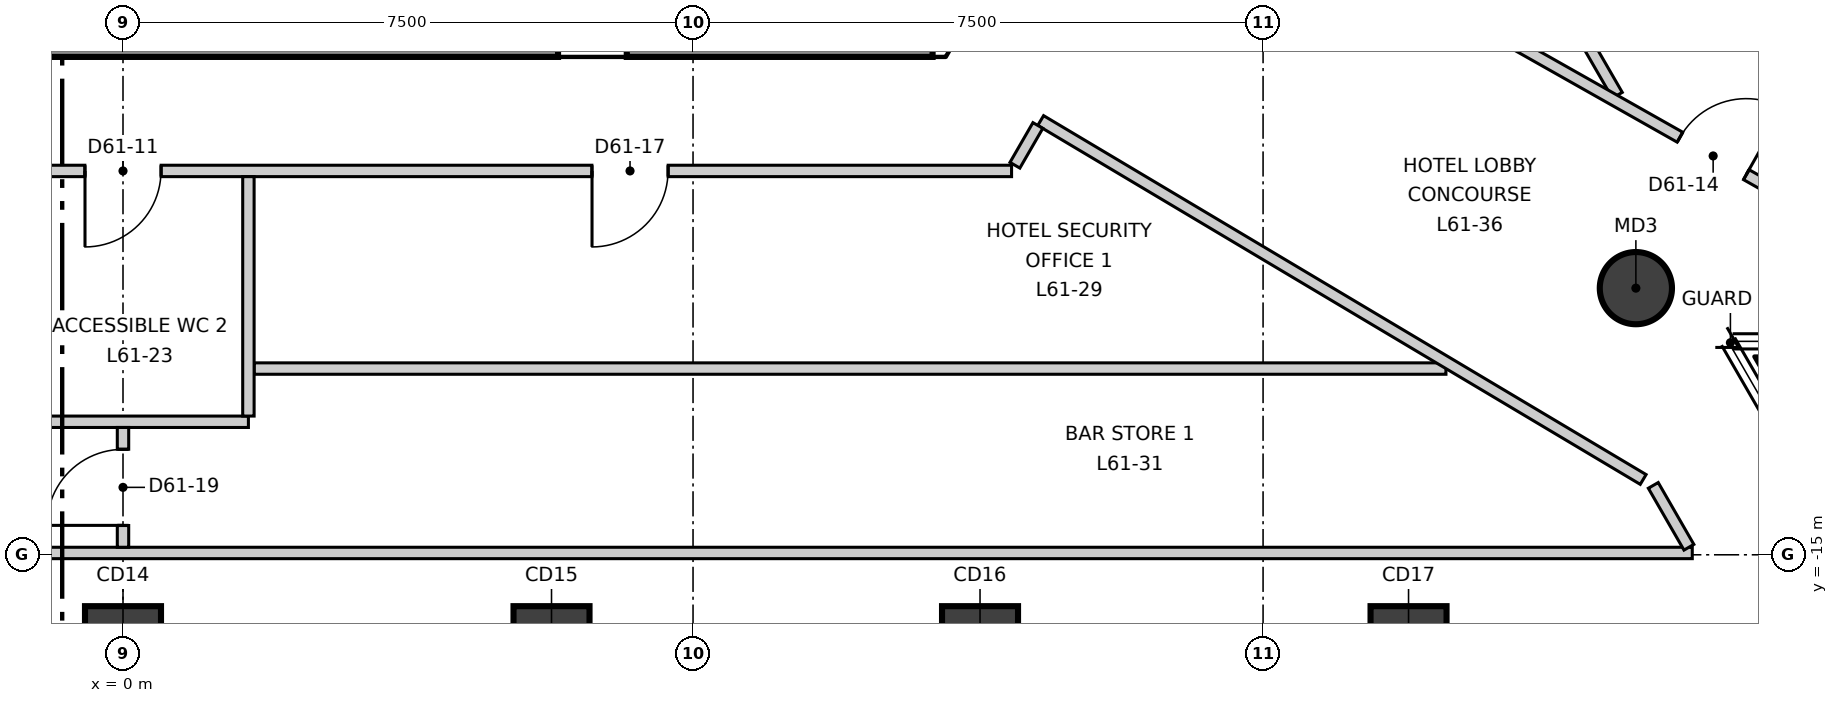
"""IFC4 building model, lengths in metres.
Left out: names, types, materials, properties, quantities, classifications, styles, units other than length and angle.
Written with IfcOpenShell. Run it as: python <this file> out.ifc"""

import sys

from ifc_helpers import new_model, si_unit, direction, frame, frame_2d, origin, origin_2d, place, context, subcontext, project, spatial, polyline, rectangle, circle, outline, extrude, element, fill, save


model = new_model("IFC4")
c1 = context("Model", 3, precision=1e-05, world=origin(), true_north=direction((0.0, 1.0)))
c2 = subcontext(c1, "Body", "Model", "MODEL_VIEW")
j1 = project(units=[si_unit("LENGTHUNIT", "METRE"), si_unit("PLANEANGLEUNIT", "RADIAN")], contexts=[c1])
p1 = place(None, origin())
s1 = spatial("IfcSite", under=j1, at=p1, CompositionType="ELEMENT")
p2 = place(p1, origin())
s2 = spatial("IfcBuilding", under=s1, at=p2, CompositionType="ELEMENT")
p3 = place(p2, frame((0.0, 0.0, 261.8)))
s3 = spatial("IfcBuildingStorey", under=s2, at=p3, CompositionType="ELEMENT", Elevation=261.8)
p4 = place(p3, frame((-10.652, -8.15, -0.3), z_axis=(0.0, 0.0, 1.0), x_axis=(1.0, 0.0, 0.0)))
e1 = element("IfcWall", 1, at=p4, inside=s3, PredefinedType="SHEAR", context=c2, shape_type="SweptSolid", body=[
    extrude(outline(polyline([(-0.173, -0.3), (1.795, -0.3), (3.763, -0.3), (5.731, -0.3), (7.7, -0.3), (9.668, -0.3), (11.636, -0.3), (13.604, -0.3), (15.573, -0.3), (17.541, -0.3), (19.509, -0.3), (21.477, -0.3), (21.131, 0.3), (19.226, 0.3), (17.321, 0.3), (15.415, 0.3), (13.51, 0.3), (11.605, 0.3), (9.699, 0.3), (7.794, 0.3), (5.889, 0.3), (3.984, 0.3), (2.078, 0.3), (0.173, 0.3), (-0.173, -0.3)])), origin(), (0.0, 0.0, 1.0), 6.5),
])
p5 = place(p4, frame((4.026, 0.0, 0.3)))
e2 = element("IfcOpeningElement", 2, at=p5, cuts=e1, PredefinedType="OPENING", context=c2, shape_type="SweptSolid", body=[
    extrude(rectangle(XDim=0.9, YDim=2.1, at=frame_2d((0.45, 1.05))), frame((0.0, 0.31, 0.0), z_axis=(0.0, -1.0, 0.0), x_axis=(1.0, 0.0, 0.0)), (0.0, 0.0, 1.0), 0.62),
])
p6 = place(p4, frame((16.378, 0.0, 0.3)))
e3 = element("IfcOpeningElement", 3, at=p6, cuts=e1, PredefinedType="OPENING", context=c2, shape_type="SweptSolid", body=[
    extrude(rectangle(XDim=0.9, YDim=2.1, at=frame_2d((0.45, 1.05))), frame((0.0, 0.31, 0.0), z_axis=(0.0, -1.0, 0.0), x_axis=(1.0, 0.0, 0.0)), (0.0, 0.0, 1.0), 0.62),
])
p7 = place(p3, frame((10.652, -8.15, -0.3), z_axis=(0.0, 0.0, 1.0), x_axis=(0.49997462182, 0.866040055388, 0.0)))
e4 = element("IfcWall", 4, at=p7, inside=s3, PredefinedType="SHEAR", context=c2, shape_type="SweptSolid", body=[
    extrude(outline(polyline([(-0.173, -0.3), (1.732, -0.301), (3.638, -0.301), (3.291, 0.3), (1.732, 0.3), (0.173, 0.3), (-0.173, -0.3)])), origin(), (0.0, 0.0, 1.0), 6.5),
])
p8 = place(p7, frame((1.032, 0.0, 0.3)))
e5 = element("IfcOpeningElement", 5, at=p8, cuts=e4, PredefinedType="OPENING", context=c2, shape_type="SweptSolid", body=[
    extrude(rectangle(XDim=1.4, YDim=2.1, at=frame_2d((0.7, 1.05))), frame((0.0, 0.31, 0.0), z_axis=(0.0, -1.0, 0.0), x_axis=(1.0, 0.0, 0.0)), (0.0, 0.0, 1.0), 0.621),
])
for number, where, z_axis, x_axis in (
    (6, (0.0, -16.076, -0.3), (0.0, 0.0, 1.0), (1.0, 0.0, 0.0)),
    (7, (5.638, -16.076, -0.3), (0.0, 0.0, 1.0), (1.0, 0.0, 0.0)),
    (8, (11.276, -16.076, -0.3), (0.0, 0.0, 1.0), (1.0, 0.0, 0.0)),
    (9, (16.914, -16.076, -0.3), (0.0, 0.0, 1.0), (1.0, 0.0, 0.0)),
):
    element("IfcColumn", number, at=place(p3, frame(where, z_axis=z_axis, x_axis=x_axis)), inside=s3, PredefinedType="COLUMN", context=c2, shape_type="SweptSolid", body=[
        extrude(rectangle(XDim=1.0, YDim=0.8, at=origin_2d()), origin(), (0.0, 0.0, 1.0), 6.5),
    ])
p9 = place(p3, frame((19.905, -11.492, -0.3), z_axis=(0.0, 0.0, 1.0), x_axis=(1.0, 0.0, 0.0)))
e10 = element("IfcColumn", 10, at=p9, inside=s3, PredefinedType="COLUMN", context=c2, shape_type="SweptSolid", body=[
    extrude(circle(Radius=0.475, at=origin_2d()), origin(), (0.0, 0.0, 1.0), 6.5),
])
p10 = place(p3, frame((2.689, 25.293, 0.0), z_axis=(0.0, 0.0, 1.0), x_axis=(0.500022309378, -0.866012523076, 0.0)))
e11 = element("IfcWall", 11, at=p10, inside=s3, PredefinedType="PARTITIONING", context=c2, shape_type="SweptSolid", body=[
    extrude(rectangle(XDim=41.206, YDim=0.15, at=frame_2d((20.603, 0.0))), origin(), (0.0, 0.0, 1.0), 6.2),
])
p11 = place(p3, frame((2.166, 21.349, 0.0), z_axis=(0.0, 0.0, 1.0), x_axis=(0.499984980739, -0.866034074985, 0.0)))
e12 = element("IfcWall", 12, at=p11, inside=s3, PredefinedType="PARTITIONING", context=c2, shape_type="SweptSolid", body=[
    extrude(rectangle(XDim=34.991, YDim=0.15, at=frame_2d((17.495, 0.0))), origin(), (0.0, 0.0, 1.0), 6.2),
])
p12 = place(p3, frame((14.048, -5.869, 0.0), z_axis=(0.0, 0.0, 1.0), x_axis=(0.870623660774, -0.491949632889, 0.0)))
e13 = element("IfcWall", 13, at=p12, inside=s3, PredefinedType="PARTITIONING", context=c2, shape_type="SweptSolid", body=[
    extrude(rectangle(XDim=9.194, YDim=0.15, at=frame_2d((4.597, 0.0))), origin(), (0.0, 0.0, 1.0), 5.65),
])
p13 = place(p12, frame((7.395, 0.0, 0.0)))
e14 = element("IfcOpeningElement", 14, at=p13, cuts=e13, PredefinedType="OPENING", context=c2, shape_type="SweptSolid", body=[
    extrude(rectangle(XDim=1.0, YDim=2.1, at=frame_2d((0.5, 1.05))), frame((0.0, 0.085, 0.0), z_axis=(0.0, -1.0, 0.0), x_axis=(1.0, 0.0, 0.0)), (0.0, 0.0, 1.0), 0.17),
])
p14 = place(p3, frame((-11.605, -9.95, 0.0), z_axis=(0.0, 0.0, 1.0), x_axis=(1.0, 0.0, 0.0)))
e15 = element("IfcWall", 15, at=p14, inside=s3, PredefinedType="PARTITIONING", context=c2, shape_type="SweptSolid", body=[
    extrude(rectangle(XDim=23.296, YDim=0.15, at=frame_2d((11.648, 0.0))), origin(), (0.0, 0.0, 1.0), 6.2),
])
p15 = place(p14, frame((11.105, 0.0, 0.0)))
e16 = element("IfcOpeningElement", 16, at=p15, cuts=e15, PredefinedType="OPENING", context=c2, shape_type="SweptSolid", body=[
    extrude(rectangle(XDim=1.0, YDim=2.1, at=frame_2d((0.5, 1.05))), frame((0.0, 0.085, 0.0), z_axis=(0.0, -1.0, 0.0), x_axis=(1.0, 0.0, 0.0)), (0.0, 0.0, 1.0), 0.17),
])
p16 = place(p14, frame((4.034, 0.0, 0.0)))
e17 = element("IfcOpeningElement", 17, at=p16, cuts=e15, PredefinedType="OPENING", context=c2, shape_type="SweptSolid", body=[
    extrude(rectangle(XDim=1.8, YDim=2.1, at=frame_2d((0.9, 1.05))), frame((0.0, 0.085, 0.0), z_axis=(0.0, -1.0, 0.0), x_axis=(1.0, 0.0, 0.0)), (0.0, 0.0, 1.0), 0.17),
])
p17 = place(p14, frame((17.776, 0.0, 0.0)))
e18 = element("IfcOpeningElement", 18, at=p17, cuts=e15, PredefinedType="OPENING", context=c2, shape_type="SweptSolid", body=[
    extrude(rectangle(XDim=1.0, YDim=2.1, at=frame_2d((0.5, 1.05))), frame((0.0, 0.085, 0.0), z_axis=(0.0, -1.0, 0.0), x_axis=(1.0, 0.0, 0.0)), (0.0, 0.0, 1.0), 0.17),
])
p18 = place(p3, frame((-20.647, -14.976, 0.0), z_axis=(0.0, 0.0, 1.0), x_axis=(1.0, 0.0, 0.0)))
e19 = element("IfcWall", 19, at=p18, inside=s3, PredefinedType="PARTITIONING", context=c2, shape_type="SweptSolid", body=[
    extrude(rectangle(XDim=41.294, YDim=0.15, at=frame_2d((20.647, 0.0))), origin(), (0.0, 0.0, 1.0), 6.2),
])
p19 = place(p18, frame((10.047, 0.0, 0.0)))
e20 = element("IfcOpeningElement", 20, at=p19, cuts=e19, PredefinedType="OPENING", context=c2, shape_type="SweptSolid", body=[
    extrude(rectangle(XDim=2.4, YDim=2.1, at=frame_2d((1.2, 1.05))), frame((0.0, 0.085, 0.0), z_axis=(0.0, -1.0, 0.0), x_axis=(1.0, 0.0, 0.0)), (0.0, 0.0, 1.0), 0.17),
])
p20 = place(p3, frame((1.725, -12.55, 0.0), z_axis=(0.0, 0.0, 1.0), x_axis=(1.0, 0.0, 0.0)))
e21 = element("IfcWall", 21, at=p20, inside=s3, PredefinedType="PARTITIONING", context=c2, shape_type="SweptSolid", body=[
    extrude(rectangle(XDim=15.681, YDim=0.15, at=frame_2d((7.84, 0.0))), origin(), (0.0, 0.0, 1.0), 6.2),
])
p21 = place(p3, frame((20.134, -14.087, 0.0), z_axis=(0.0, 0.0, 1.0), x_axis=(0.499242408381, -0.866462357909, 0.0)))
e22 = element("IfcWall", 22, at=p21, inside=s3, PredefinedType="PARTITIONING", context=c2, shape_type="SweptSolid", body=[
    extrude(rectangle(XDim=0.939, YDim=0.15, at=frame_2d((0.47, 0.0))), origin(), (0.0, 0.0, 1.0), 6.2),
])
p22 = place(p3, frame((-1.575, -13.25, 0.0), z_axis=(0.0, 0.0, 1.0), x_axis=(1.0, 0.0, 0.0)))
e23 = element("IfcWall", 23, at=p22, inside=s3, PredefinedType="PARTITIONING", context=c2, shape_type="SweptSolid", body=[
    extrude(rectangle(XDim=3.225, YDim=0.15, at=frame_2d((1.612, 0.0))), origin(), (0.0, 0.0, 1.0), 6.2),
])
p23 = place(p3, frame((0.0, -14.901, 0.0), z_axis=(0.0, 0.0, 1.0), x_axis=(0.0, 1.0, 0.0)))
e24 = element("IfcWall", 24, at=p23, inside=s3, PredefinedType="PARTITIONING", context=c2, shape_type="SweptSolid", body=[
    extrude(rectangle(XDim=1.576, YDim=0.15, at=frame_2d((0.788, 0.0))), origin(), (0.0, 0.0, 1.0), 5.7),
])
p24 = place(p23, frame((0.288, 0.0, 0.0)))
e25 = element("IfcOpeningElement", 25, at=p24, cuts=e24, PredefinedType="OPENING", context=c2, shape_type="SweptSolid", body=[
    extrude(rectangle(XDim=1.0, YDim=2.1, at=frame_2d((0.5, 1.05))), frame((0.0, 0.085, 0.0), z_axis=(0.0, -1.0, 0.0), x_axis=(1.0, 0.0, 0.0)), (0.0, 0.0, 1.0), 0.17),
])
p25 = place(p3, frame((12.074, -9.287, 0.0), z_axis=(0.0, 0.0, 1.0), x_axis=(0.859127534181, -0.511761546047, 0.0)))
e26 = element("IfcWall", 26, at=p25, inside=s3, PredefinedType="PARTITIONING", context=c2, shape_type="SweptSolid", body=[
    extrude(rectangle(XDim=9.227, YDim=0.15, at=frame_2d((4.613, 0.0))), origin(), (0.0, 0.0, 1.0), 5.65),
])
p26 = place(p3, frame((1.65, -13.175, 0.0), z_axis=(0.0, 0.0, 1.0), x_axis=(0.0, 1.0, 0.0)))
e27 = element("IfcWall", 27, at=p26, inside=s3, PredefinedType="PARTITIONING", context=c2, shape_type="SweptSolid", body=[
    extrude(rectangle(XDim=3.15, YDim=0.15, at=frame_2d((1.575, 0.0))), origin(), (0.0, 0.0, 1.0), 6.2),
])
p27 = place(p3, frame((11.735, -9.875, 0.0), z_axis=(0.0, 0.0, 1.0), x_axis=(0.500095727698, 0.865970128318, 0.0)))
e28 = element("IfcWall", 28, at=p27, inside=s3, PredefinedType="PARTITIONING", context=c2, shape_type="SweptSolid", body=[
    extrude(rectangle(XDim=0.604, YDim=0.15, at=frame_2d((0.302, 0.0))), origin(), (0.0, 0.0, 1.0), 6.2),
])
p28 = place(p15, origin())
e29 = element("IfcDoor", 29, at=p28, inside=s3, OperationType="SINGLE_SWING_LEFT", PredefinedType="DOOR", context=c2, shape_type="SweptSolid", body=[
    extrude(rectangle(XDim=1.0, YDim=2.1, at=frame_2d((0.5, 1.05))), frame((0.0, 0.025, 0.0), z_axis=(0.0, -1.0, 0.0), x_axis=(1.0, 0.0, 0.0)), (0.0, 0.0, 1.0), 0.05),
])
fill(e16, e29)
p29 = place(p13, origin())
e30 = element("IfcDoor", 30, at=p29, inside=s3, OperationType="SINGLE_SWING_LEFT", PredefinedType="DOOR", context=c2, shape_type="SweptSolid", body=[
    extrude(rectangle(XDim=1.0, YDim=2.1, at=frame_2d((0.5, 1.05))), frame((0.0, 0.025, 0.0), z_axis=(0.0, -1.0, 0.0), x_axis=(1.0, 0.0, 0.0)), (0.0, 0.0, 1.0), 0.05),
])
fill(e14, e30)
p30 = place(p17, origin())
e31 = element("IfcDoor", 31, at=p30, inside=s3, OperationType="SINGLE_SWING_LEFT", PredefinedType="DOOR", context=c2, shape_type="SweptSolid", body=[
    extrude(rectangle(XDim=1.0, YDim=2.1, at=frame_2d((0.5, 1.05))), frame((0.0, 0.025, 0.0), z_axis=(0.0, -1.0, 0.0), x_axis=(1.0, 0.0, 0.0)), (0.0, 0.0, 1.0), 0.05),
])
fill(e18, e31)
p31 = place(p24, origin())
e32 = element("IfcDoor", 32, at=p31, inside=s3, OperationType="SINGLE_SWING_RIGHT", PredefinedType="DOOR", context=c2, shape_type="SweptSolid", body=[
    extrude(rectangle(XDim=1.0, YDim=2.1, at=frame_2d((0.5, 1.05))), frame((0.0, 0.025, 0.0), z_axis=(0.0, -1.0, 0.0), x_axis=(1.0, 0.0, 0.0)), (0.0, 0.0, 1.0), 0.05),
])
fill(e25, e32)
save(model, sys.argv[1])
